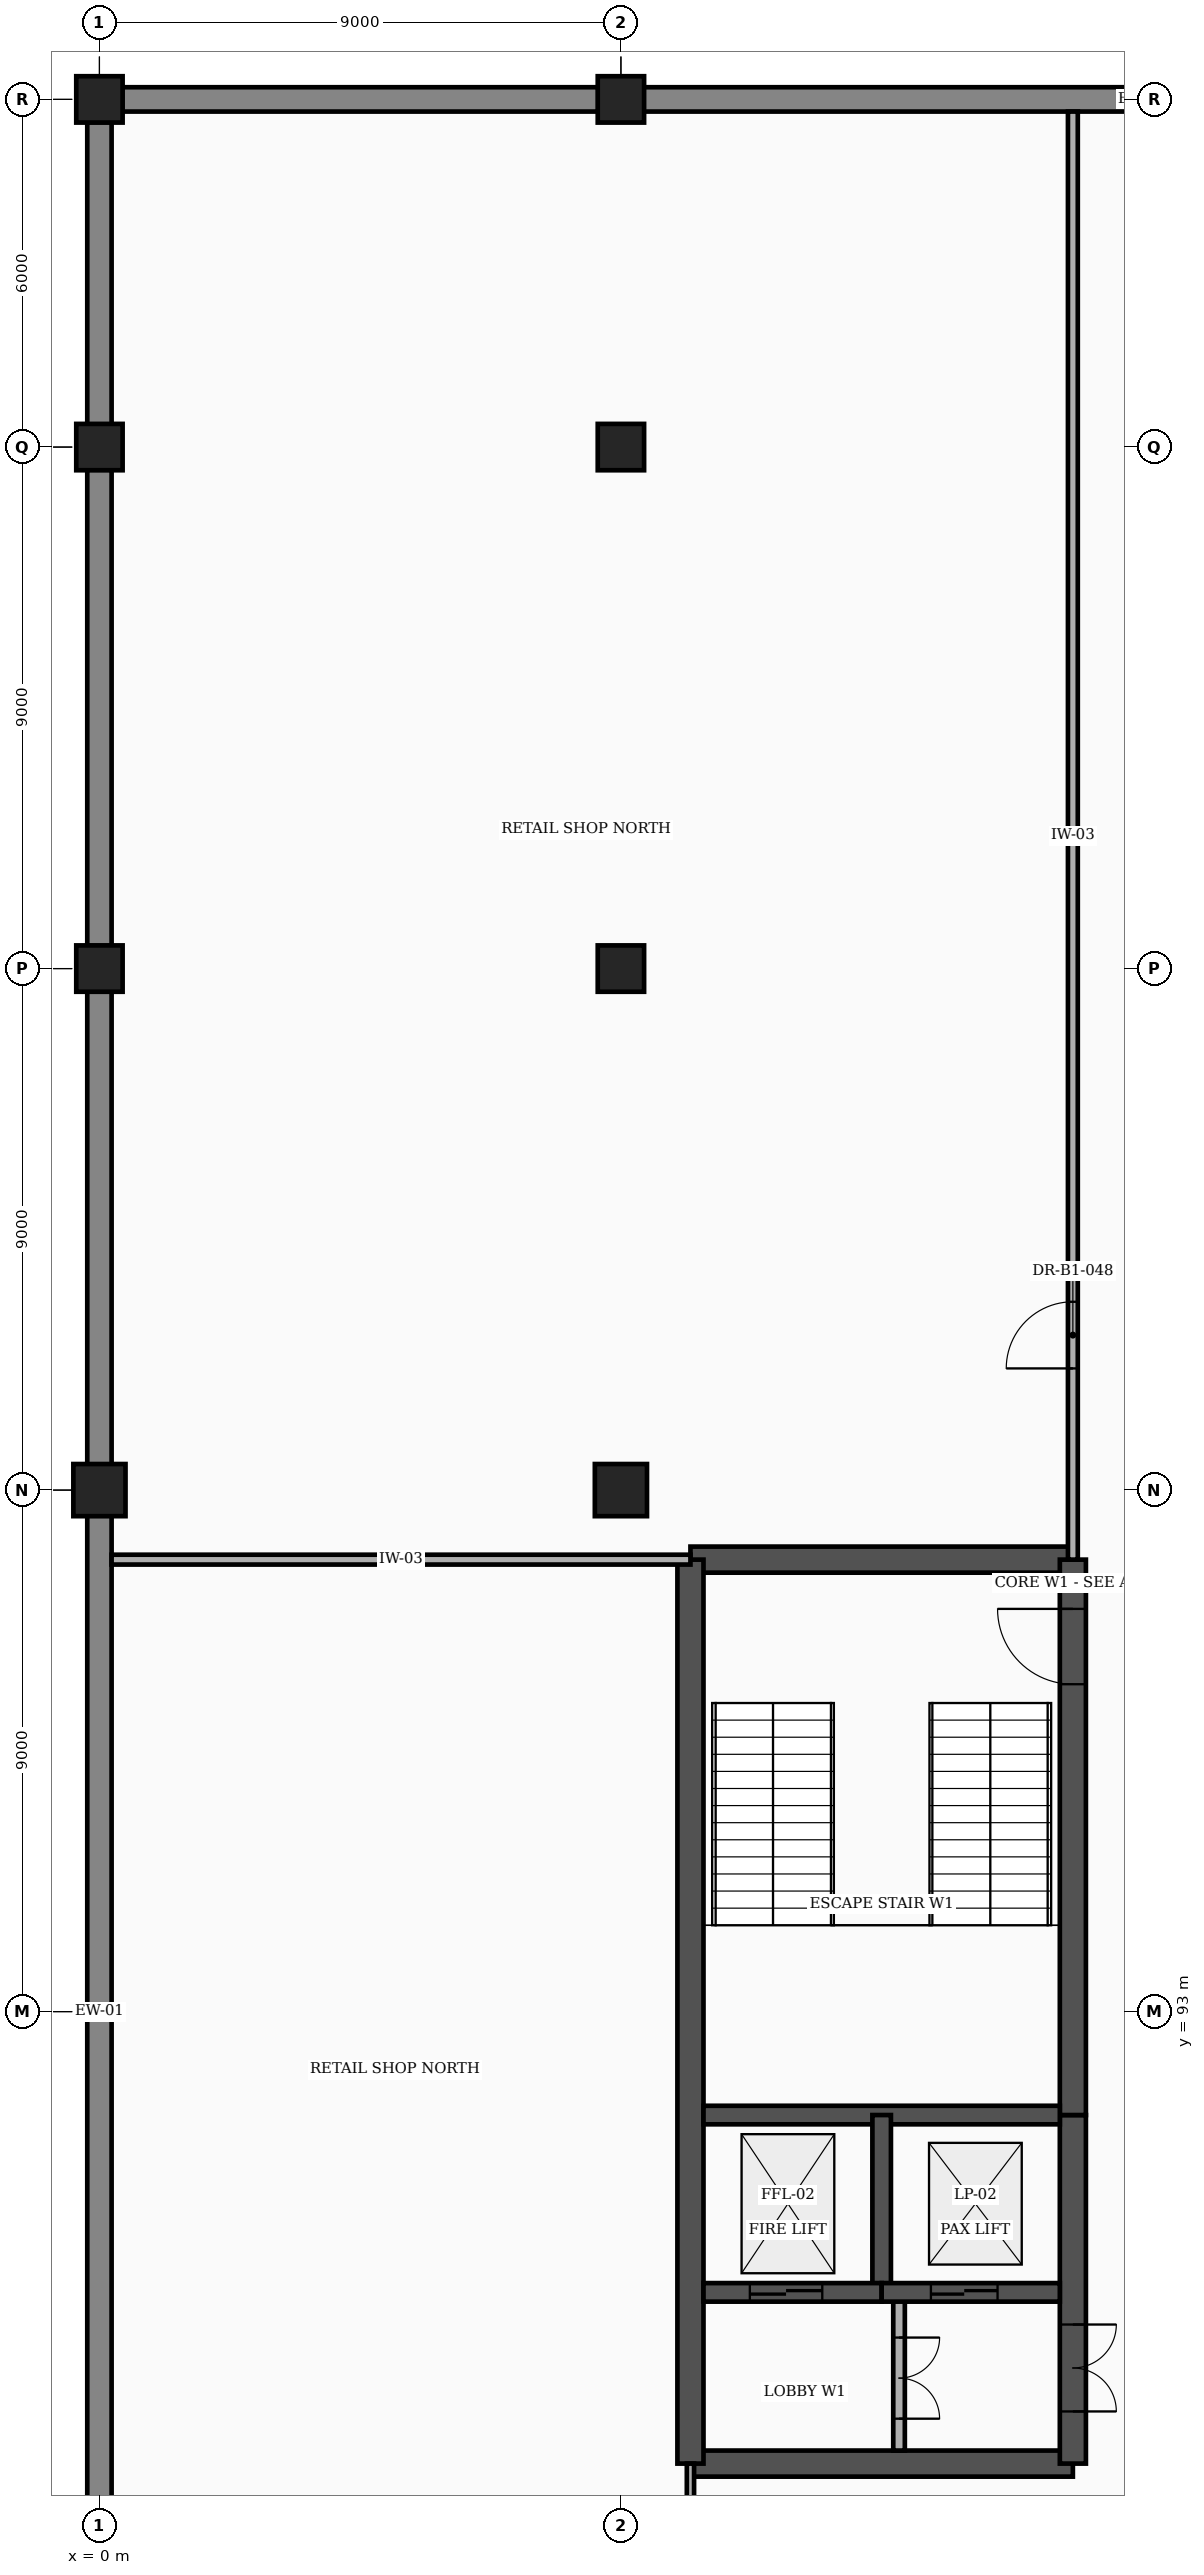
"""IFC4 building model, lengths in metres.
Left out: names, types, materials, properties, quantities, classifications, styles, units other than length and angle.
Written with IfcOpenShell. Run it as: python <this file> out.ifc"""

import sys

from ifc_helpers import new_model, si_unit, direction, frame, frame_2d, origin, origin_2d, place, context, subcontext, project, spatial, rectangle, extrude, element, fill, save


model = new_model("IFC4")
c1 = context("Model", 3, precision=1e-05, world=origin(), true_north=direction((0.0, 1.0)))
c2 = subcontext(c1, "Body", "Model", "MODEL_VIEW")
j1 = project(units=[si_unit("LENGTHUNIT", "METRE"), si_unit("PLANEANGLEUNIT", "RADIAN")], contexts=[c1])
p1 = place(None, origin())
s1 = spatial("IfcSite", under=j1, at=p1, CompositionType="ELEMENT")
p2 = place(p1, origin())
s2 = spatial("IfcBuilding", under=s1, at=p2, CompositionType="ELEMENT")
p3 = place(p2, frame((0.0, 0.0, -4.5)))
s3 = spatial("IfcBuildingStorey", under=s2, at=p3, CompositionType="ELEMENT", Elevation=-4.5)
p4 = place(p3, frame((0.0, 102.0, -0.45), z_axis=(0.0, 0.0, 1.0), x_axis=(1.0, 0.0, 0.0)))
e1 = element("IfcColumn", 1, at=p4, inside=s3, PredefinedType="COLUMN", context=c2, shape_type="SweptSolid", body=[
    extrude(rectangle(XDim=0.9, YDim=0.9, at=origin_2d()), origin(), (0.0, 0.0, 1.0), 4.95),
])
for number, where, z_axis, x_axis in (
    (2, (0.0, 111.0, -0.45), (0.0, 0.0, 1.0), (1.0, 0.0, 0.0)),
    (3, (0.0, 120.0, -0.45), (0.0, 0.0, 1.0), (1.0, 0.0, 0.0)),
    (4, (0.0, 126.0, -0.45), (0.0, 0.0, 1.0), (1.0, 0.0, 0.0)),
):
    element("IfcColumn", number, at=place(p3, frame(where, z_axis=z_axis, x_axis=x_axis)), inside=s3, PredefinedType="COLUMN", context=c2, shape_type="SweptSolid", body=[
        extrude(rectangle(XDim=0.8, YDim=0.8, at=origin_2d()), origin(), (0.0, 0.0, 1.0), 4.95),
    ])
p5 = place(p3, frame((9.0, 102.0, -0.45), z_axis=(0.0, 0.0, 1.0), x_axis=(1.0, 0.0, 0.0)))
e5 = element("IfcColumn", 5, at=p5, inside=s3, PredefinedType="COLUMN", context=c2, shape_type="SweptSolid", body=[
    extrude(rectangle(XDim=0.9, YDim=0.9, at=origin_2d()), origin(), (0.0, 0.0, 1.0), 4.95),
])
for number, where, z_axis, x_axis in (
    (6, (9.0, 111.0, -0.45), (0.0, 0.0, 1.0), (1.0, 0.0, 0.0)),
    (7, (9.0, 120.0, -0.45), (0.0, 0.0, 1.0), (1.0, 0.0, 0.0)),
    (8, (9.0, 126.0, -0.45), (0.0, 0.0, 1.0), (1.0, 0.0, 0.0)),
):
    element("IfcColumn", number, at=place(p3, frame(where, z_axis=z_axis, x_axis=x_axis)), inside=s3, PredefinedType="COLUMN", context=c2, shape_type="SweptSolid", body=[
        extrude(rectangle(XDim=0.8, YDim=0.8, at=origin_2d()), origin(), (0.0, 0.0, 1.0), 4.95),
    ])
p6 = place(p3, frame((0.392, 126.0, 0.0), z_axis=(0.0, 0.0, 1.0), x_axis=(1.0, 0.0, 0.0)))
e9 = element("IfcWall", 9, at=p6, inside=s3, PredefinedType="STANDARD", context=c2, shape_type="SweptSolid", body=[
    extrude(rectangle(XDim=8.216, YDim=0.42, at=frame_2d((4.108, 0.0))), origin(), (0.0, 0.0, 1.0), 3.7),
])
p7 = place(p3, frame((9.392, 126.0, 0.0), z_axis=(0.0, 0.0, 1.0), x_axis=(1.0, 0.0, 0.0)))
e10 = element("IfcWall", 10, at=p7, inside=s3, PredefinedType="STANDARD", context=c2, shape_type="SweptSolid", body=[
    extrude(rectangle(XDim=17.216, YDim=0.42, at=frame_2d((8.608, 0.0))), origin(), (0.0, 0.0, 1.0), 3.7),
])
p8 = place(p3, frame((0.0, 84.442, 0.0), z_axis=(0.0, 0.0, 1.0), x_axis=(0.0, 1.0, 0.0)))
e11 = element("IfcWall", 11, at=p8, inside=s3, PredefinedType="STANDARD", context=c2, shape_type="SweptSolid", body=[
    extrude(rectangle(XDim=17.116, YDim=0.42, at=frame_2d((8.558, 0.0))), origin(), (0.0, 0.0, 1.0), 3.7),
])
p9 = place(p3, frame((0.0, 102.442, 0.0), z_axis=(0.0, 0.0, 1.0), x_axis=(0.0, 1.0, 0.0)))
e12 = element("IfcWall", 12, at=p9, inside=s3, PredefinedType="STANDARD", context=c2, shape_type="SweptSolid", body=[
    extrude(rectangle(XDim=8.166, YDim=0.42, at=frame_2d((4.083, 0.0))), origin(), (0.0, 0.0, 1.0), 3.7),
])
p10 = place(p3, frame((0.0, 111.392, 0.0), z_axis=(0.0, 0.0, 1.0), x_axis=(0.0, 1.0, 0.0)))
e13 = element("IfcWall", 13, at=p10, inside=s3, PredefinedType="STANDARD", context=c2, shape_type="SweptSolid", body=[
    extrude(rectangle(XDim=8.216, YDim=0.42, at=frame_2d((4.108, 0.0))), origin(), (0.0, 0.0, 1.0), 3.7),
])
p11 = place(p3, frame((0.0, 120.392, 0.0), z_axis=(0.0, 0.0, 1.0), x_axis=(0.0, 1.0, 0.0)))
e14 = element("IfcWall", 14, at=p11, inside=s3, PredefinedType="STANDARD", context=c2, shape_type="SweptSolid", body=[
    extrude(rectangle(XDim=5.216, YDim=0.42, at=frame_2d((2.608, 0.0))), origin(), (0.0, 0.0, 1.0), 3.7),
])
for number, where, z_axis, x_axis in (
    (15, (10.2, 85.2, 0.0), (0.0, 0.0, 1.0), (1.0, 0.0, 0.0)),
    (16, (10.2, 100.8, 0.0), (0.0, 0.0, 1.0), (1.0, 0.0, 0.0)),
):
    element("IfcWall", number, at=place(p3, frame(where, z_axis=z_axis, x_axis=x_axis)), inside=s3, PredefinedType="SHEAR", context=c2, shape_type="SweptSolid", body=[
        extrude(rectangle(XDim=6.6, YDim=0.45, at=frame_2d((3.3, 0.0))), origin(), (0.0, 0.0, 1.0), 4.24),
    ])
p12 = place(p3, frame((10.2, 85.2, 0.0), z_axis=(0.0, 0.0, 1.0), x_axis=(0.0, 1.0, 0.0)))
e17 = element("IfcWall", 17, at=p12, inside=s3, PredefinedType="SHEAR", context=c2, shape_type="SweptSolid", body=[
    extrude(rectangle(XDim=15.6, YDim=0.45, at=frame_2d((7.8, 0.0))), origin(), (0.0, 0.0, 1.0), 4.24),
])
p13 = place(p3, frame((16.8, 85.2, 0.0), z_axis=(0.0, 0.0, 1.0), x_axis=(0.0, 1.0, 0.0)))
e18 = element("IfcWall", 18, at=p13, inside=s3, PredefinedType="SHEAR", context=c2, shape_type="SweptSolid", body=[
    extrude(rectangle(XDim=6.015, YDim=0.45, at=frame_2d((3.008, 0.0))), origin(), (0.0, 0.0, 1.0), 4.24),
])
p14 = place(p13, frame((0.9, 0.0, 0.0)))
e19 = element("IfcOpeningElement", 19, at=p14, cuts=e18, PredefinedType="OPENING", context=c2, shape_type="SweptSolid", body=[
    extrude(rectangle(XDim=1.5, YDim=2.2, at=frame_2d((0.75, 1.1))), frame((0.0, 0.237, 0.0), z_axis=(0.0, -1.0, 0.0), x_axis=(1.0, 0.0, 0.0)), (0.0, 0.0, 1.0), 0.474),
])
p15 = place(p3, frame((16.8, 91.215, 0.0), z_axis=(0.0, 0.0, 1.0), x_axis=(0.0, 1.0, 0.0)))
e20 = element("IfcWall", 20, at=p15, inside=s3, PredefinedType="SHEAR", context=c2, shape_type="SweptSolid", body=[
    extrude(rectangle(XDim=9.585, YDim=0.45, at=frame_2d((4.792, 0.0))), origin(), (0.0, 0.0, 1.0), 4.24),
])
p16 = place(p15, frame((7.435, 0.0, 0.0)))
e21 = element("IfcOpeningElement", 21, at=p16, cuts=e20, PredefinedType="OPENING", context=c2, shape_type="SweptSolid", body=[
    extrude(rectangle(XDim=1.3, YDim=2.2, at=frame_2d((0.65, 1.1))), frame((0.0, 0.237, 0.0), z_axis=(0.0, -1.0, 0.0), x_axis=(1.0, 0.0, 0.0)), (0.0, 0.0, 1.0), 0.474),
])
p17 = place(p3, frame((10.425, 91.215, 0.0), z_axis=(0.0, 0.0, 1.0), x_axis=(1.0, 0.0, 0.0)))
e22 = element("IfcWall", 22, at=p17, inside=s3, PredefinedType="SHEAR", context=c2, shape_type="SweptSolid", body=[
    extrude(rectangle(XDim=6.15, YDim=0.32, at=frame_2d((3.075, 0.0))), origin(), (0.0, 0.0, 1.0), 4.24),
])
p18 = place(p3, frame((13.5, 88.155, 0.0), z_axis=(0.0, 0.0, 1.0), x_axis=(0.0, 1.0, 0.0)))
e23 = element("IfcWall", 23, at=p18, inside=s3, PredefinedType="SHEAR", context=c2, shape_type="SweptSolid", body=[
    extrude(rectangle(XDim=3.06, YDim=0.32, at=frame_2d((1.53, 0.0))), origin(), (0.0, 0.0, 1.0), 4.24),
])
p19 = place(p3, frame((13.8, 85.425, 0.0), z_axis=(0.0, 0.0, 1.0), x_axis=(0.0, 1.0, 0.0)))
e24 = element("IfcWall", 24, at=p19, inside=s3, PredefinedType="PARTITIONING", context=c2, shape_type="SweptSolid", body=[
    extrude(rectangle(XDim=2.73, YDim=0.2, at=frame_2d((1.365, 0.0))), origin(), (0.0, 0.0, 1.0), 4.24),
])
p20 = place(p19, frame((0.55, 0.0, 0.0)))
e25 = element("IfcOpeningElement", 25, at=p20, cuts=e24, PredefinedType="OPENING", context=c2, shape_type="SweptSolid", body=[
    extrude(rectangle(XDim=1.4, YDim=2.25, at=frame_2d((0.7, 1.125))), frame((0.0, 0.112, 0.0), z_axis=(0.0, -1.0, 0.0), x_axis=(1.0, 0.0, 0.0)), (0.0, 0.0, 1.0), 0.224),
])
p21 = place(p3, frame((10.425, 88.155, 0.0), z_axis=(0.0, 0.0, 1.0), x_axis=(1.0, 0.0, 0.0)))
e26 = element("IfcWall", 26, at=p21, inside=s3, PredefinedType="SHEAR", context=c2, shape_type="SweptSolid", body=[
    extrude(rectangle(XDim=3.075, YDim=0.32, at=frame_2d((1.538, 0.0))), origin(), (0.0, 0.0, 1.0), 4.24),
])
p22 = place(p21, frame((0.8, 0.0, 0.0)))
e27 = element("IfcOpeningElement", 27, at=p22, cuts=e26, PredefinedType="OPENING", context=c2, shape_type="SweptSolid", body=[
    extrude(rectangle(XDim=1.25, YDim=2.25, at=frame_2d((0.625, 1.125))), frame((0.0, 0.172, 0.0), z_axis=(0.0, -1.0, 0.0), x_axis=(1.0, 0.0, 0.0)), (0.0, 0.0, 1.0), 0.344),
])
p23 = place(p3, frame((13.5, 88.155, 0.0), z_axis=(0.0, 0.0, 1.0), x_axis=(1.0, 0.0, 0.0)))
e28 = element("IfcWall", 28, at=p23, inside=s3, PredefinedType="SHEAR", context=c2, shape_type="SweptSolid", body=[
    extrude(rectangle(XDim=3.075, YDim=0.32, at=frame_2d((1.538, 0.0))), origin(), (0.0, 0.0, 1.0), 4.24),
])
p24 = place(p23, frame((0.85, 0.0, 0.0)))
e29 = element("IfcOpeningElement", 29, at=p24, cuts=e28, PredefinedType="OPENING", context=c2, shape_type="SweptSolid", body=[
    extrude(rectangle(XDim=1.15, YDim=2.2, at=frame_2d((0.575, 1.1))), frame((0.0, 0.172, 0.0), z_axis=(0.0, -1.0, 0.0), x_axis=(1.0, 0.0, 0.0)), (0.0, 0.0, 1.0), 0.344),
])
p25 = place(p3, frame((10.2, 83.2, 0.0), z_axis=(0.0, 0.0, 1.0), x_axis=(0.0, 1.0, 0.0)))
e30 = element("IfcWall", 30, at=p25, inside=s3, PredefinedType="PARTITIONING", context=c2, shape_type="SweptSolid", body=[
    extrude(rectangle(XDim=2.0, YDim=0.125, at=frame_2d((1.0, 0.0))), origin(), (0.0, 0.0, 1.0), 4.24),
])
p26 = place(p3, frame((0.21, 100.8, 0.0), z_axis=(0.0, 0.0, 1.0), x_axis=(1.0, 0.0, 0.0)))
e31 = element("IfcWall", 31, at=p26, inside=s3, PredefinedType="PARTITIONING", context=c2, shape_type="SweptSolid", body=[
    extrude(rectangle(XDim=9.99, YDim=0.17, at=frame_2d((4.995, 0.0))), origin(), (0.0, 0.0, 1.0), 4.24),
])
p27 = place(p3, frame((16.8, 100.8, 0.0), z_axis=(0.0, 0.0, 1.0), x_axis=(0.0, 1.0, 0.0)))
e32 = element("IfcWall", 32, at=p27, inside=s3, PredefinedType="PARTITIONING", context=c2, shape_type="SweptSolid", body=[
    extrude(rectangle(XDim=24.99, YDim=0.17, at=frame_2d((12.495, 0.0))), origin(), (0.0, 0.0, 1.0), 4.24),
])
p28 = place(p27, frame((3.3, 0.0, 0.0)))
e33 = element("IfcOpeningElement", 33, at=p28, cuts=e32, PredefinedType="OPENING", context=c2, shape_type="SweptSolid", body=[
    extrude(rectangle(XDim=1.15, YDim=2.15, at=frame_2d((0.575, 1.075))), frame((0.0, 0.097, 0.0), z_axis=(0.0, -1.0, 0.0), x_axis=(1.0, 0.0, 0.0)), (0.0, 0.0, 1.0), 0.194),
])
p29 = place(p14, frame((1.5, 0.0, 0.0), z_axis=(0.0, 0.0, 1.0), x_axis=(-1.0, 0.0, 0.0)))
e34 = element("IfcDoor", 34, at=p29, inside=s3, OperationType="DOUBLE_DOOR_SINGLE_SWING", PredefinedType="DOOR", context=c2, shape_type="SweptSolid", body=[
    extrude(rectangle(XDim=1.5, YDim=2.2, at=frame_2d((0.75, 1.1))), frame((0.0, 0.025, 0.0), z_axis=(0.0, -1.0, 0.0), x_axis=(1.0, 0.0, 0.0)), (0.0, 0.0, 1.0), 0.05),
])
fill(e19, e34)
p30 = place(p16, origin())
e35 = element("IfcDoor", 35, at=p30, inside=s3, OperationType="SINGLE_SWING_RIGHT", PredefinedType="DOOR", context=c2, shape_type="SweptSolid", body=[
    extrude(rectangle(XDim=1.3, YDim=2.2, at=frame_2d((0.65, 1.1))), frame((0.0, 0.025, 0.0), z_axis=(0.0, -1.0, 0.0), x_axis=(1.0, 0.0, 0.0)), (0.0, 0.0, 1.0), 0.05),
])
fill(e21, e35)
p31 = place(p20, frame((1.4, 0.0, 0.0), z_axis=(0.0, 0.0, 1.0), x_axis=(-1.0, 0.0, 0.0)))
e36 = element("IfcDoor", 36, at=p31, inside=s3, OperationType="DOUBLE_DOOR_SINGLE_SWING", PredefinedType="DOOR", context=c2, shape_type="SweptSolid", body=[
    extrude(rectangle(XDim=1.4, YDim=2.25, at=frame_2d((0.7, 1.125))), frame((0.0, 0.025, 0.0), z_axis=(0.0, -1.0, 0.0), x_axis=(1.0, 0.0, 0.0)), (0.0, 0.0, 1.0), 0.05),
])
fill(e25, e36)
p32 = place(p22, origin())
e37 = element("IfcDoor", 37, at=p32, inside=s3, OperationType="DOUBLE_DOOR_SLIDING", PredefinedType="DOOR", context=c2, shape_type="SweptSolid", body=[
    extrude(rectangle(XDim=1.25, YDim=2.25, at=frame_2d((0.625, 1.125))), frame((0.0, 0.025, 0.0), z_axis=(0.0, -1.0, 0.0), x_axis=(1.0, 0.0, 0.0)), (0.0, 0.0, 1.0), 0.05),
])
fill(e27, e37)
p33 = place(p24, origin())
e38 = element("IfcDoor", 38, at=p33, inside=s3, OperationType="DOUBLE_DOOR_SLIDING", PredefinedType="DOOR", context=c2, shape_type="SweptSolid", body=[
    extrude(rectangle(XDim=1.15, YDim=2.2, at=frame_2d((0.575, 1.1))), frame((0.0, 0.025, 0.0), z_axis=(0.0, -1.0, 0.0), x_axis=(1.0, 0.0, 0.0)), (0.0, 0.0, 1.0), 0.05),
])
fill(e29, e38)
p34 = place(p28, origin())
e39 = element("IfcDoor", 39, at=p34, inside=s3, OperationType="SINGLE_SWING_LEFT", PredefinedType="DOOR", context=c2, shape_type="SweptSolid", body=[
    extrude(rectangle(XDim=1.15, YDim=2.15, at=frame_2d((0.575, 1.075))), frame((0.0, 0.025, 0.0), z_axis=(0.0, -1.0, 0.0), x_axis=(1.0, 0.0, 0.0)), (0.0, 0.0, 1.0), 0.05),
])
fill(e33, e39)
save(model, sys.argv[1])
